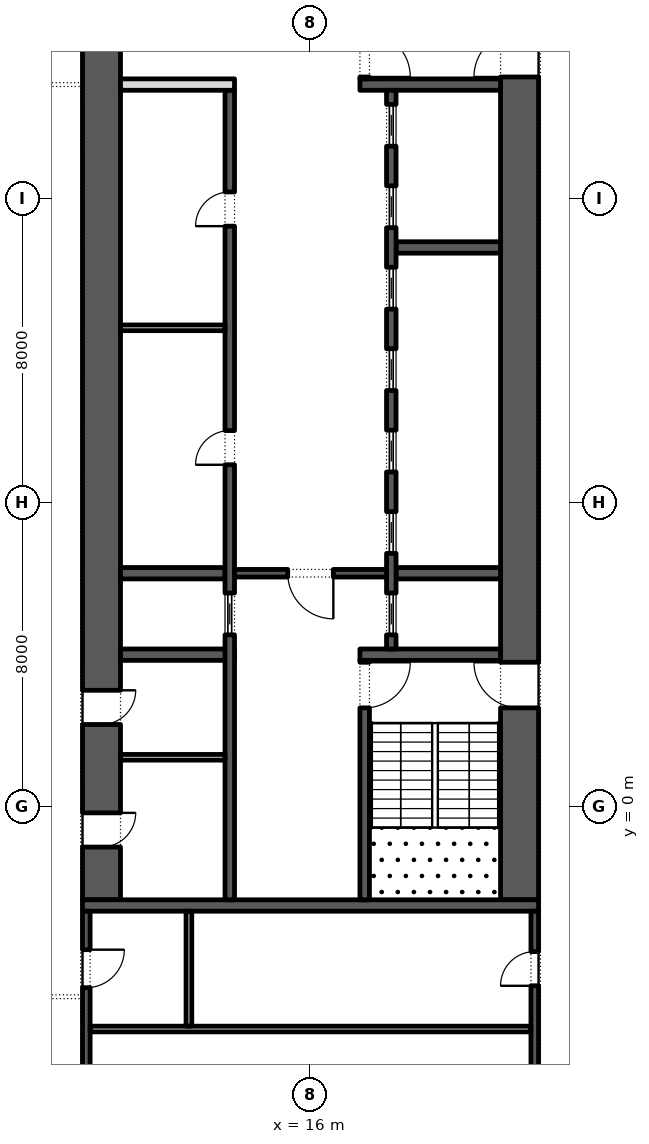
"""IFC4 building model, lengths in metres.
Left out: names, types, materials, properties, quantities, classifications, styles, units other than length and angle.
Written with IfcOpenShell. Run it as: python <this file> out.ifc"""

import sys

from ifc_helpers import new_model, si_unit, direction, frame, frame_2d, origin, place, context, subcontext, project, spatial, rectangle, extrude, element, fill, save


model = new_model("IFC4")
c1 = context("Model", 3, precision=1e-05, world=origin(), true_north=direction((0.0, 1.0)))
c2 = subcontext(c1, "Body", "Model", "MODEL_VIEW")
j1 = project(units=[si_unit("LENGTHUNIT", "METRE"), si_unit("PLANEANGLEUNIT", "RADIAN")], contexts=[c1])
p1 = place(None, origin())
s1 = spatial("IfcSite", under=j1, at=p1, CompositionType="ELEMENT")
p2 = place(p1, origin())
s2 = spatial("IfcBuilding", under=s1, at=p2, CompositionType="ELEMENT")
p3 = place(p2, frame((0.0, 0.0, 90.0)))
s3 = spatial("IfcBuildingStorey", under=s2, at=p3, CompositionType="ELEMENT", Elevation=90.0)
p4 = place(p3, frame((21.5, -2.45, 0.0), z_axis=(0.0, 0.0, 1.0), x_axis=(0.0, 1.0, 0.0)))
e1 = element("IfcWall", 1, at=p4, inside=s3, PredefinedType="SHEAR", context=c2, shape_type="SweptSolid", body=[
    extrude(rectangle(XDim=27.9, YDim=1.0, at=frame_2d((13.95, 0.0))), origin(), (0.0, 0.0, 1.0), 3.9),
])
p5 = place(p4, frame((5.05, 0.0, 0.0)))
e2 = element("IfcOpeningElement", 2, at=p5, cuts=e1, PredefinedType="OPENING", context=c2, shape_type="SweptSolid", body=[
    extrude(rectangle(XDim=1.2, YDim=2.1, at=frame_2d((0.6, 1.05))), frame((0.0, 0.51, 0.0), z_axis=(0.0, -1.0, 0.0), x_axis=(1.0, 0.0, 0.0)), (0.0, 0.0, 1.0), 1.02),
])
p6 = place(p4, frame((21.65, 0.0, 0.0)))
e3 = element("IfcOpeningElement", 3, at=p6, cuts=e1, PredefinedType="OPENING", context=c2, shape_type="SweptSolid", body=[
    extrude(rectangle(XDim=1.2, YDim=2.1, at=frame_2d((0.6, 1.05))), frame((0.0, 0.51, 0.0), z_axis=(0.0, -1.0, 0.0), x_axis=(1.0, 0.0, 0.0)), (0.0, 0.0, 1.0), 1.02),
])
p7 = place(p3, frame((10.5, -2.45, 0.0), z_axis=(0.0, 0.0, 1.0), x_axis=(0.0, 1.0, 0.0)))
e4 = element("IfcWall", 4, at=p7, inside=s3, PredefinedType="SHEAR", context=c2, shape_type="SweptSolid", body=[
    extrude(rectangle(XDim=27.9, YDim=1.0, at=frame_2d((13.95, 0.0))), origin(), (0.0, 0.0, 1.0), 3.9),
])
p8 = place(p7, frame((23.65, 0.0, 0.0)))
e5 = element("IfcOpeningElement", 5, at=p8, cuts=e4, PredefinedType="OPENING", context=c2, shape_type="SweptSolid", body=[
    extrude(rectangle(XDim=2.4, YDim=2.1, at=frame_2d((1.2, 1.05))), frame((0.0, 0.51, 0.0), z_axis=(0.0, -1.0, 0.0), x_axis=(1.0, 0.0, 0.0)), (0.0, 0.0, 1.0), 1.02),
])
p9 = place(p7, frame((1.387, 0.0, 0.0)))
e6 = element("IfcOpeningElement", 6, at=p9, cuts=e4, PredefinedType="OPENING", context=c2, shape_type="SweptSolid", body=[
    extrude(rectangle(XDim=0.9, YDim=2.1, at=frame_2d((0.45, 1.05))), frame((0.0, 0.51, 0.0), z_axis=(0.0, -1.0, 0.0), x_axis=(1.0, 0.0, 0.0)), (0.0, 0.0, 1.0), 1.02),
])
p10 = place(p7, frame((4.613, 0.0, 0.0)))
e7 = element("IfcOpeningElement", 7, at=p10, cuts=e4, PredefinedType="OPENING", context=c2, shape_type="SweptSolid", body=[
    extrude(rectangle(XDim=0.9, YDim=2.1, at=frame_2d((0.45, 1.05))), frame((0.0, 0.51, 0.0), z_axis=(0.0, -1.0, 0.0), x_axis=(1.0, 0.0, 0.0)), (0.0, 0.0, 1.0), 1.02),
])
p11 = place(p3, frame((10.0, -2.6, 0.0), z_axis=(0.0, 0.0, 1.0), x_axis=(1.0, 0.0, 0.0)))
e8 = element("IfcWall", 8, at=p11, inside=s3, PredefinedType="SHEAR", context=c2, shape_type="SweptSolid", body=[
    extrude(rectangle(XDim=12.0, YDim=0.3, at=frame_2d((6.0, 0.0))), origin(), (0.0, 0.0, 1.0), 3.9),
])
p12 = place(p3, frame((17.3, 4.0, 0.0), z_axis=(0.0, 0.0, 1.0), x_axis=(1.0, 0.0, 0.0)))
e9 = element("IfcWall", 9, at=p12, inside=s3, PredefinedType="SHEAR", context=c2, shape_type="SweptSolid", body=[
    extrude(rectangle(XDim=3.7, YDim=0.3, at=frame_2d((1.85, 0.0))), origin(), (0.0, 0.0, 1.0), 3.9),
])
p13 = place(p3, frame((17.425, -2.45, 0.0), z_axis=(0.0, 0.0, 1.0), x_axis=(0.0, 1.0, 0.0)))
e10 = element("IfcWall", 10, at=p13, inside=s3, PredefinedType="SHEAR", context=c2, shape_type="SweptSolid", body=[
    extrude(rectangle(XDim=6.3, YDim=0.25, at=frame_2d((3.15, 0.0))), origin(), (0.0, 0.0, 1.0), 3.9),
])
p14 = place(p13, frame((5.05, 0.0, 0.0)))
e11 = element("IfcOpeningElement", 11, at=p14, cuts=e10, PredefinedType="OPENING", context=c2, shape_type="SweptSolid", body=[
    extrude(rectangle(XDim=1.2, YDim=2.1, at=frame_2d((0.6, 1.05))), frame((0.0, 0.135, 0.0), z_axis=(0.0, -1.0, 0.0), x_axis=(1.0, 0.0, 0.0)), (0.0, 0.0, 1.0), 0.27),
])
p15 = place(p3, frame((17.3, 19.0, 0.0), z_axis=(0.0, 0.0, 1.0), x_axis=(1.0, 0.0, 0.0)))
e12 = element("IfcWall", 12, at=p15, inside=s3, PredefinedType="SHEAR", context=c2, shape_type="SweptSolid", body=[
    extrude(rectangle(XDim=3.7, YDim=0.3, at=frame_2d((1.85, 0.0))), origin(), (0.0, 0.0, 1.0), 3.9),
])
p16 = place(p3, frame((17.425, 19.15, 0.0), z_axis=(0.0, 0.0, 1.0), x_axis=(0.0, 1.0, 0.0)))
e13 = element("IfcWall", 13, at=p16, inside=s3, PredefinedType="SHEAR", context=c2, shape_type="SweptSolid", body=[
    extrude(rectangle(XDim=6.3, YDim=0.25, at=frame_2d((3.15, 0.0))), origin(), (0.0, 0.0, 1.0), 3.9),
])
p17 = place(p16, frame((0.05, 0.0, 0.0)))
e14 = element("IfcOpeningElement", 14, at=p17, cuts=e13, PredefinedType="OPENING", context=c2, shape_type="SweptSolid", body=[
    extrude(rectangle(XDim=1.2, YDim=2.1, at=frame_2d((0.6, 1.05))), frame((0.0, 0.135, 0.0), z_axis=(0.0, -1.0, 0.0), x_axis=(1.0, 0.0, 0.0)), (0.0, 0.0, 1.0), 0.27),
])
for number, where, z_axis, x_axis in (
    (15, (18.25, 6.143, 0.0), (0.0, 0.0, 1.0), (1.0, 0.0, 0.0)),
    (16, (18.25, 14.714, 0.0), (0.0, 0.0, 1.0), (1.0, 0.0, 0.0)),
):
    element("IfcWall", number, at=place(p3, frame(where, z_axis=z_axis, x_axis=x_axis)), inside=s3, PredefinedType="SHEAR", context=c2, shape_type="SweptSolid", body=[
        extrude(rectangle(XDim=2.75, YDim=0.3, at=frame_2d((1.375, 0.0))), origin(), (0.0, 0.0, 1.0), 3.9),
    ])
p18 = place(p3, frame((18.125, 4.15, 0.0), z_axis=(0.0, 0.0, 1.0), x_axis=(0.0, 1.0, 0.0)))
e17 = element("IfcWall", 17, at=p18, inside=s3, PredefinedType="SHEAR", context=c2, shape_type="SweptSolid", body=[
    extrude(rectangle(XDim=14.7, YDim=0.25, at=frame_2d((7.35, 0.0))), origin(), (0.0, 0.0, 1.0), 3.9),
])
p19 = place(p18, frame((0.371, 0.0, 0.0)))
e18 = element("IfcOpeningElement", 18, at=p19, cuts=e17, PredefinedType="OPENING", context=c2, shape_type="SweptSolid", body=[
    extrude(rectangle(XDim=1.1, YDim=2.1, at=frame_2d((0.55, 1.05))), frame((0.0, 0.135, 0.0), z_axis=(0.0, -1.0, 0.0), x_axis=(1.0, 0.0, 0.0)), (0.0, 0.0, 1.0), 0.27),
])
p20 = place(p18, frame((2.514, 0.0, 0.0)))
e19 = element("IfcOpeningElement", 19, at=p20, cuts=e17, PredefinedType="OPENING", context=c2, shape_type="SweptSolid", body=[
    extrude(rectangle(XDim=1.1, YDim=2.1, at=frame_2d((0.55, 1.05))), frame((0.0, 0.135, 0.0), z_axis=(0.0, -1.0, 0.0), x_axis=(1.0, 0.0, 0.0)), (0.0, 0.0, 1.0), 0.27),
])
p21 = place(p18, frame((4.657, 0.0, 0.0)))
e20 = element("IfcOpeningElement", 20, at=p21, cuts=e17, PredefinedType="OPENING", context=c2, shape_type="SweptSolid", body=[
    extrude(rectangle(XDim=1.1, YDim=2.1, at=frame_2d((0.55, 1.05))), frame((0.0, 0.135, 0.0), z_axis=(0.0, -1.0, 0.0), x_axis=(1.0, 0.0, 0.0)), (0.0, 0.0, 1.0), 0.27),
])
p22 = place(p18, frame((6.8, 0.0, 0.0)))
e21 = element("IfcOpeningElement", 21, at=p22, cuts=e17, PredefinedType="OPENING", context=c2, shape_type="SweptSolid", body=[
    extrude(rectangle(XDim=1.1, YDim=2.1, at=frame_2d((0.55, 1.05))), frame((0.0, 0.135, 0.0), z_axis=(0.0, -1.0, 0.0), x_axis=(1.0, 0.0, 0.0)), (0.0, 0.0, 1.0), 0.27),
])
p23 = place(p18, frame((8.943, 0.0, 0.0)))
e22 = element("IfcOpeningElement", 22, at=p23, cuts=e17, PredefinedType="OPENING", context=c2, shape_type="SweptSolid", body=[
    extrude(rectangle(XDim=1.1, YDim=2.1, at=frame_2d((0.55, 1.05))), frame((0.0, 0.135, 0.0), z_axis=(0.0, -1.0, 0.0), x_axis=(1.0, 0.0, 0.0)), (0.0, 0.0, 1.0), 0.27),
])
p24 = place(p18, frame((11.086, 0.0, 0.0)))
e23 = element("IfcOpeningElement", 23, at=p24, cuts=e17, PredefinedType="OPENING", context=c2, shape_type="SweptSolid", body=[
    extrude(rectangle(XDim=1.1, YDim=2.1, at=frame_2d((0.55, 1.05))), frame((0.0, 0.135, 0.0), z_axis=(0.0, -1.0, 0.0), x_axis=(1.0, 0.0, 0.0)), (0.0, 0.0, 1.0), 0.27),
])
p25 = place(p18, frame((13.229, 0.0, 0.0)))
e24 = element("IfcOpeningElement", 24, at=p25, cuts=e17, PredefinedType="OPENING", context=c2, shape_type="SweptSolid", body=[
    extrude(rectangle(XDim=1.1, YDim=2.1, at=frame_2d((0.55, 1.05))), frame((0.0, 0.135, 0.0), z_axis=(0.0, -1.0, 0.0), x_axis=(1.0, 0.0, 0.0)), (0.0, 0.0, 1.0), 0.27),
])
p26 = place(p3, frame((11.0, 4.0, 0.0), z_axis=(0.0, 0.0, 1.0), x_axis=(1.0, 0.0, 0.0)))
e25 = element("IfcWall", 25, at=p26, inside=s3, PredefinedType="SHEAR", context=c2, shape_type="SweptSolid", body=[
    extrude(rectangle(XDim=3.0, YDim=0.3, at=frame_2d((1.5, 0.0))), origin(), (0.0, 0.0, 1.0), 3.9),
])
p27 = place(p3, frame((11.0, 6.143, 0.0), z_axis=(0.0, 0.0, 1.0), x_axis=(1.0, 0.0, 0.0)))
e26 = element("IfcWall", 26, at=p27, inside=s3, PredefinedType="SHEAR", context=c2, shape_type="SweptSolid", body=[
    extrude(rectangle(XDim=2.75, YDim=0.3, at=frame_2d((1.375, 0.0))), origin(), (0.0, 0.0, 1.0), 3.9),
])
p28 = place(p3, frame((13.875, -2.45, 0.0), z_axis=(0.0, 0.0, 1.0), x_axis=(0.0, 1.0, 0.0)))
e27 = element("IfcWall", 27, at=p28, inside=s3, PredefinedType="SHEAR", context=c2, shape_type="SweptSolid", body=[
    extrude(rectangle(XDim=21.3, YDim=0.25, at=frame_2d((10.65, 0.0))), origin(), (0.0, 0.0, 1.0), 3.9),
])
p29 = place(p28, frame((11.446, 0.0, 0.0)))
e28 = element("IfcOpeningElement", 28, at=p29, cuts=e27, PredefinedType="OPENING", context=c2, shape_type="SweptSolid", body=[
    extrude(rectangle(XDim=0.9, YDim=2.1, at=frame_2d((0.45, 1.05))), frame((0.0, 0.135, 0.0), z_axis=(0.0, -1.0, 0.0), x_axis=(1.0, 0.0, 0.0)), (0.0, 0.0, 1.0), 0.27),
])
p30 = place(p28, frame((17.725, 0.0, 0.0)))
e29 = element("IfcOpeningElement", 29, at=p30, cuts=e27, PredefinedType="OPENING", context=c2, shape_type="SweptSolid", body=[
    extrude(rectangle(XDim=0.9, YDim=2.1, at=frame_2d((0.45, 1.05))), frame((0.0, 0.135, 0.0), z_axis=(0.0, -1.0, 0.0), x_axis=(1.0, 0.0, 0.0)), (0.0, 0.0, 1.0), 0.27),
])
p31 = place(p28, frame((6.971, 0.0, 0.0)))
e30 = element("IfcOpeningElement", 30, at=p31, cuts=e27, PredefinedType="OPENING", context=c2, shape_type="SweptSolid", body=[
    extrude(rectangle(XDim=1.1, YDim=2.1, at=frame_2d((0.55, 1.05))), frame((0.0, 0.135, 0.0), z_axis=(0.0, -1.0, 0.0), x_axis=(1.0, 0.0, 0.0)), (0.0, 0.0, 1.0), 0.27),
])
p32 = place(p3, frame((11.0, 19.0, 0.0), z_axis=(0.0, 0.0, 1.0), x_axis=(1.0, 0.0, 0.0)))
e31 = element("IfcWall", 31, at=p32, inside=s3, PredefinedType="PARTITIONING", context=c2, shape_type="SweptSolid", body=[
    extrude(rectangle(XDim=3.0, YDim=0.3, at=frame_2d((1.5, 0.0))), origin(), (0.0, 0.0, 1.0), 3.9),
])
p33 = place(p3, frame((11.0, 12.6, 0.0), z_axis=(0.0, 0.0, 1.0), x_axis=(1.0, 0.0, 0.0)))
e32 = element("IfcWall", 32, at=p33, inside=s3, PredefinedType="PARTITIONING", context=c2, shape_type="SweptSolid", body=[
    extrude(rectangle(XDim=2.75, YDim=0.15, at=frame_2d((1.375, 0.0))), origin(), (0.0, 0.0, 1.0), 3.9),
])
p34 = place(p3, frame((14.0, 6.143, 0.0), z_axis=(0.0, 0.0, 1.0), x_axis=(1.0, 0.0, 0.0)))
e33 = element("IfcWall", 33, at=p34, inside=s3, PredefinedType="SHEAR", context=c2, shape_type="SweptSolid", body=[
    extrude(rectangle(XDim=4.0, YDim=0.2, at=frame_2d((2.0, 0.0))), origin(), (0.0, 0.0, 1.0), 3.9),
])
p35 = place(p34, frame((1.4, 0.0, 0.0)))
e34 = element("IfcOpeningElement", 34, at=p35, cuts=e33, PredefinedType="OPENING", context=c2, shape_type="SweptSolid", body=[
    extrude(rectangle(XDim=1.2, YDim=2.1, at=frame_2d((0.6, 1.05))), frame((0.0, 0.11, 0.0), z_axis=(0.0, -1.0, 0.0), x_axis=(1.0, 0.0, 0.0)), (0.0, 0.0, 1.0), 0.22),
])
p36 = place(p3, frame((11.0, 1.3, 0.0), z_axis=(0.0, 0.0, 1.0), x_axis=(1.0, 0.0, 0.0)))
e35 = element("IfcWall", 35, at=p36, inside=s3, PredefinedType="PARTITIONING", context=c2, shape_type="SweptSolid", body=[
    extrude(rectangle(XDim=2.75, YDim=0.15, at=frame_2d((1.375, 0.0))), origin(), (0.0, 0.0, 1.0), 3.9),
])
p37 = place(p3, frame((21.9, -15.8, 0.0), z_axis=(0.0, 0.0, 1.0), x_axis=(0.0, 1.0, 0.0)))
e36 = element("IfcWall", 36, at=p37, inside=s3, PredefinedType="SHEAR", context=c2, shape_type="SweptSolid", body=[
    extrude(rectangle(XDim=13.05, YDim=0.2, at=frame_2d((6.525, 0.0))), origin(), (0.0, 0.0, 1.0), 3.9),
])
p38 = place(p37, frame((11.087, 0.0, 0.0)))
e37 = element("IfcOpeningElement", 37, at=p38, cuts=e36, PredefinedType="OPENING", context=c2, shape_type="SweptSolid", body=[
    extrude(rectangle(XDim=0.9, YDim=2.1, at=frame_2d((0.45, 1.05))), frame((0.0, 0.11, 0.0), z_axis=(0.0, -1.0, 0.0), x_axis=(1.0, 0.0, 0.0)), (0.0, 0.0, 1.0), 0.22),
])
p39 = place(p3, frame((10.1, -15.8, 0.0), z_axis=(0.0, 0.0, 1.0), x_axis=(0.0, 1.0, 0.0)))
e38 = element("IfcWall", 38, at=p39, inside=s3, PredefinedType="SHEAR", context=c2, shape_type="SweptSolid", body=[
    extrude(rectangle(XDim=13.05, YDim=0.2, at=frame_2d((6.525, 0.0))), origin(), (0.0, 0.0, 1.0), 3.9),
])
p40 = place(p39, frame((4.488, 0.0, 0.0)))
e39 = element("IfcOpeningElement", 39, at=p40, cuts=e38, PredefinedType="OPENING", context=c2, shape_type="SweptSolid", body=[
    extrude(rectangle(XDim=0.9, YDim=2.1, at=frame_2d((0.45, 1.05))), frame((0.0, 0.11, 0.0), z_axis=(0.0, -1.0, 0.0), x_axis=(1.0, 0.0, 0.0)), (0.0, 0.0, 1.0), 0.22),
])
p41 = place(p39, frame((11.038, 0.0, 0.0)))
e40 = element("IfcOpeningElement", 40, at=p41, cuts=e38, PredefinedType="OPENING", context=c2, shape_type="SweptSolid", body=[
    extrude(rectangle(XDim=1.0, YDim=2.1, at=frame_2d((0.5, 1.05))), frame((0.0, 0.11, 0.0), z_axis=(0.0, -1.0, 0.0), x_axis=(1.0, 0.0, 0.0)), (0.0, 0.0, 1.0), 0.22),
])
p42 = place(p3, frame((10.2, -5.85, 0.0), z_axis=(0.0, 0.0, 1.0), x_axis=(1.0, 0.0, 0.0)))
e41 = element("IfcWall", 41, at=p42, inside=s3, PredefinedType="PARTITIONING", context=c2, shape_type="SweptSolid", body=[
    extrude(rectangle(XDim=11.6, YDim=0.15, at=frame_2d((5.8, 0.0))), origin(), (0.0, 0.0, 1.0), 3.9),
])
p43 = place(p3, frame((12.8, -5.775, 0.0), z_axis=(0.0, 0.0, 1.0), x_axis=(0.0, 1.0, 0.0)))
e42 = element("IfcWall", 42, at=p43, inside=s3, PredefinedType="PARTITIONING", context=c2, shape_type="SweptSolid", body=[
    extrude(rectangle(XDim=3.025, YDim=0.15, at=frame_2d((1.512, 0.0))), origin(), (0.0, 0.0, 1.0), 3.9),
])
p44 = place(p19, origin())
e43 = element("IfcDoor", 43, at=p44, inside=s3, OperationType="SLIDING_TO_LEFT", PredefinedType="DOOR", context=c2, shape_type="SweptSolid", body=[
    extrude(rectangle(XDim=1.1, YDim=2.1, at=frame_2d((0.55, 1.05))), frame((0.0, 0.025, 0.0), z_axis=(0.0, -1.0, 0.0), x_axis=(1.0, 0.0, 0.0)), (0.0, 0.0, 1.0), 0.05),
])
fill(e18, e43)
p45 = place(p20, origin())
e44 = element("IfcDoor", 44, at=p45, inside=s3, OperationType="SLIDING_TO_LEFT", PredefinedType="DOOR", context=c2, shape_type="SweptSolid", body=[
    extrude(rectangle(XDim=1.1, YDim=2.1, at=frame_2d((0.55, 1.05))), frame((0.0, 0.025, 0.0), z_axis=(0.0, -1.0, 0.0), x_axis=(1.0, 0.0, 0.0)), (0.0, 0.0, 1.0), 0.05),
])
fill(e19, e44)
p46 = place(p21, origin())
e45 = element("IfcDoor", 45, at=p46, inside=s3, OperationType="SLIDING_TO_LEFT", PredefinedType="DOOR", context=c2, shape_type="SweptSolid", body=[
    extrude(rectangle(XDim=1.1, YDim=2.1, at=frame_2d((0.55, 1.05))), frame((0.0, 0.025, 0.0), z_axis=(0.0, -1.0, 0.0), x_axis=(1.0, 0.0, 0.0)), (0.0, 0.0, 1.0), 0.05),
])
fill(e20, e45)
p47 = place(p22, origin())
e46 = element("IfcDoor", 46, at=p47, inside=s3, OperationType="SLIDING_TO_LEFT", PredefinedType="DOOR", context=c2, shape_type="SweptSolid", body=[
    extrude(rectangle(XDim=1.1, YDim=2.1, at=frame_2d((0.55, 1.05))), frame((0.0, 0.025, 0.0), z_axis=(0.0, -1.0, 0.0), x_axis=(1.0, 0.0, 0.0)), (0.0, 0.0, 1.0), 0.05),
])
fill(e21, e46)
p48 = place(p23, origin())
e47 = element("IfcDoor", 47, at=p48, inside=s3, OperationType="SLIDING_TO_LEFT", PredefinedType="DOOR", context=c2, shape_type="SweptSolid", body=[
    extrude(rectangle(XDim=1.1, YDim=2.1, at=frame_2d((0.55, 1.05))), frame((0.0, 0.025, 0.0), z_axis=(0.0, -1.0, 0.0), x_axis=(1.0, 0.0, 0.0)), (0.0, 0.0, 1.0), 0.05),
])
fill(e22, e47)
p49 = place(p24, origin())
e48 = element("IfcDoor", 48, at=p49, inside=s3, OperationType="SLIDING_TO_LEFT", PredefinedType="DOOR", context=c2, shape_type="SweptSolid", body=[
    extrude(rectangle(XDim=1.1, YDim=2.1, at=frame_2d((0.55, 1.05))), frame((0.0, 0.025, 0.0), z_axis=(0.0, -1.0, 0.0), x_axis=(1.0, 0.0, 0.0)), (0.0, 0.0, 1.0), 0.05),
])
fill(e23, e48)
p50 = place(p25, origin())
e49 = element("IfcDoor", 49, at=p50, inside=s3, OperationType="SLIDING_TO_LEFT", PredefinedType="DOOR", context=c2, shape_type="SweptSolid", body=[
    extrude(rectangle(XDim=1.1, YDim=2.1, at=frame_2d((0.55, 1.05))), frame((0.0, 0.025, 0.0), z_axis=(0.0, -1.0, 0.0), x_axis=(1.0, 0.0, 0.0)), (0.0, 0.0, 1.0), 0.05),
])
fill(e24, e49)
p51 = place(p29, origin())
e50 = element("IfcDoor", 50, at=p51, inside=s3, OperationType="SINGLE_SWING_RIGHT", PredefinedType="DOOR", context=c2, shape_type="SweptSolid", body=[
    extrude(rectangle(XDim=0.9, YDim=2.1, at=frame_2d((0.45, 1.05))), frame((0.0, 0.125, 0.0), z_axis=(0.0, -1.0, 0.0), x_axis=(1.0, 0.0, 0.0)), (0.0, 0.0, 1.0), 0.05),
])
fill(e28, e50)
p52 = place(p30, origin())
e51 = element("IfcDoor", 51, at=p52, inside=s3, OperationType="SINGLE_SWING_RIGHT", PredefinedType="DOOR", context=c2, shape_type="SweptSolid", body=[
    extrude(rectangle(XDim=0.9, YDim=2.1, at=frame_2d((0.45, 1.05))), frame((0.0, 0.125, 0.0), z_axis=(0.0, -1.0, 0.0), x_axis=(1.0, 0.0, 0.0)), (0.0, 0.0, 1.0), 0.05),
])
fill(e29, e51)
p53 = place(p31, origin())
e52 = element("IfcDoor", 52, at=p53, inside=s3, OperationType="SLIDING_TO_LEFT", PredefinedType="DOOR", context=c2, shape_type="SweptSolid", body=[
    extrude(rectangle(XDim=1.1, YDim=2.1, at=frame_2d((0.55, 1.05))), frame((0.0, 0.025, 0.0), z_axis=(0.0, -1.0, 0.0), x_axis=(1.0, 0.0, 0.0)), (0.0, 0.0, 1.0), 0.05),
])
fill(e30, e52)
p54 = place(p35, frame((1.2, 0.0, 0.0), z_axis=(0.0, 0.0, 1.0), x_axis=(-1.0, 0.0, 0.0)))
e53 = element("IfcDoor", 53, at=p54, inside=s3, OperationType="SINGLE_SWING_RIGHT", PredefinedType="DOOR", context=c2, shape_type="SweptSolid", body=[
    extrude(rectangle(XDim=1.2, YDim=2.1, at=frame_2d((0.6, 1.05))), frame((0.0, 0.025, 0.0), z_axis=(0.0, -1.0, 0.0), x_axis=(1.0, 0.0, 0.0)), (0.0, 0.0, 1.0), 0.05),
])
fill(e34, e53)
p55 = place(p14, frame((1.2, 0.0, 0.0), z_axis=(0.0, 0.0, 1.0), x_axis=(-1.0, 0.0, 0.0)))
e54 = element("IfcDoor", 54, at=p55, inside=s3, OperationType="SINGLE_SWING_RIGHT", PredefinedType="DOOR", context=c2, shape_type="SweptSolid", body=[
    extrude(rectangle(XDim=1.2, YDim=2.1, at=frame_2d((0.6, 1.05))), frame((0.0, 0.025, 0.0), z_axis=(0.0, -1.0, 0.0), x_axis=(1.0, 0.0, 0.0)), (0.0, 0.0, 1.0), 0.05),
])
fill(e11, e54)
p56 = place(p5, origin())
e55 = element("IfcDoor", 55, at=p56, inside=s3, OperationType="SINGLE_SWING_LEFT", PredefinedType="DOOR", context=c2, shape_type="SweptSolid", body=[
    extrude(rectangle(XDim=1.2, YDim=2.1, at=frame_2d((0.6, 1.05))), frame((0.0, 0.025, 0.0), z_axis=(0.0, -1.0, 0.0), x_axis=(1.0, 0.0, 0.0)), (0.0, 0.0, 1.0), 0.05),
])
fill(e2, e55)
p57 = place(p17, frame((1.2, 0.0, 0.0), z_axis=(0.0, 0.0, 1.0), x_axis=(-1.0, 0.0, 0.0)))
e56 = element("IfcDoor", 56, at=p57, inside=s3, OperationType="SINGLE_SWING_LEFT", PredefinedType="DOOR", context=c2, shape_type="SweptSolid", body=[
    extrude(rectangle(XDim=1.2, YDim=2.1, at=frame_2d((0.6, 1.05))), frame((0.0, 0.025, 0.0), z_axis=(0.0, -1.0, 0.0), x_axis=(1.0, 0.0, 0.0)), (0.0, 0.0, 1.0), 0.05),
])
fill(e14, e56)
p58 = place(p6, origin())
e57 = element("IfcDoor", 57, at=p58, inside=s3, OperationType="SINGLE_SWING_RIGHT", PredefinedType="DOOR", context=c2, shape_type="SweptSolid", body=[
    extrude(rectangle(XDim=1.2, YDim=2.1, at=frame_2d((0.6, 1.05))), frame((0.0, 0.025, 0.0), z_axis=(0.0, -1.0, 0.0), x_axis=(1.0, 0.0, 0.0)), (0.0, 0.0, 1.0), 0.05),
])
fill(e3, e57)
p59 = place(p9, frame((0.9, -0.95, 0.0), z_axis=(0.0, 0.0, 1.0), x_axis=(-1.0, 0.0, 0.0)))
e58 = element("IfcDoor", 58, at=p59, inside=s3, OperationType="SINGLE_SWING_RIGHT", PredefinedType="DOOR", context=c2, shape_type="SweptSolid", body=[
    extrude(rectangle(XDim=0.9, YDim=2.1, at=frame_2d((0.45, 1.05))), frame((0.0, -0.45, 0.0), z_axis=(0.0, -1.0, 0.0), x_axis=(1.0, 0.0, 0.0)), (0.0, 0.0, 1.0), 0.05),
])
fill(e6, e58)
p60 = place(p10, frame((0.9, -0.95, 0.0), z_axis=(0.0, 0.0, 1.0), x_axis=(-1.0, 0.0, 0.0)))
e59 = element("IfcDoor", 59, at=p60, inside=s3, OperationType="SINGLE_SWING_RIGHT", PredefinedType="DOOR", context=c2, shape_type="SweptSolid", body=[
    extrude(rectangle(XDim=0.9, YDim=2.1, at=frame_2d((0.45, 1.05))), frame((0.0, -0.45, 0.0), z_axis=(0.0, -1.0, 0.0), x_axis=(1.0, 0.0, 0.0)), (0.0, 0.0, 1.0), 0.05),
])
fill(e7, e59)
p61 = place(p41, frame((1.0, -0.15, 0.0), z_axis=(0.0, 0.0, 1.0), x_axis=(-1.0, 0.0, 0.0)))
e60 = element("IfcDoor", 60, at=p61, inside=s3, OperationType="SINGLE_SWING_RIGHT", PredefinedType="DOOR", context=c2, shape_type="SweptSolid", body=[
    extrude(rectangle(XDim=1.0, YDim=2.1, at=frame_2d((0.5, 1.05))), frame((0.0, -0.05, 0.0), z_axis=(0.0, -1.0, 0.0), x_axis=(1.0, 0.0, 0.0)), (0.0, 0.0, 1.0), 0.05),
])
fill(e40, e60)
p62 = place(p38, origin())
e61 = element("IfcDoor", 61, at=p62, inside=s3, OperationType="SINGLE_SWING_RIGHT", PredefinedType="DOOR", context=c2, shape_type="SweptSolid", body=[
    extrude(rectangle(XDim=0.9, YDim=2.1, at=frame_2d((0.45, 1.05))), frame((0.0, 0.1, 0.0), z_axis=(0.0, -1.0, 0.0), x_axis=(1.0, 0.0, 0.0)), (0.0, 0.0, 1.0), 0.05),
])
fill(e37, e61)
save(model, sys.argv[1])
